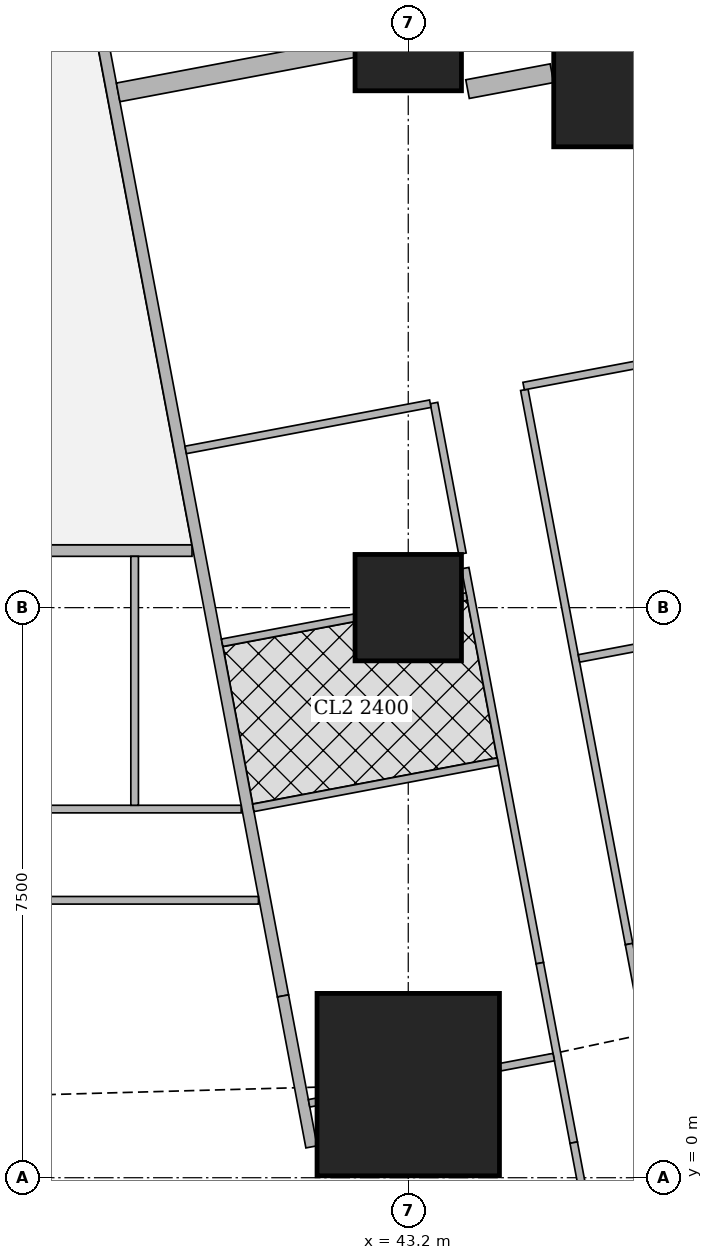
"""IFC4 building model, lengths in metres.
Left out: names, types, materials, properties, quantities, classifications, styles, units other than length and angle.
Written with IfcOpenShell. Run it as: python <this file> out.ifc"""

import sys

from ifc_helpers import new_model, si_unit, direction, frame, frame_2d, origin, origin_2d, place, context, subcontext, project, spatial, rectangle, extrude, element, fill, save


model = new_model("IFC4")
c1 = context("Model", 3, precision=1e-05, world=origin(), true_north=direction((0.0, 1.0)))
c2 = subcontext(c1, "Body", "Model", "MODEL_VIEW")
j1 = project(units=[si_unit("LENGTHUNIT", "METRE"), si_unit("PLANEANGLEUNIT", "RADIAN")], contexts=[c1])
p1 = place(None, origin())
s1 = spatial("IfcSite", under=j1, at=p1, CompositionType="ELEMENT")
p2 = place(p1, origin())
s2 = spatial("IfcBuilding", under=s1, at=p2, CompositionType="ELEMENT")
p3 = place(p2, frame((0.0, 0.0, 216.2)))
s3 = spatial("IfcBuildingStorey", under=s2, at=p3, CompositionType="ELEMENT", Elevation=216.2)
p4 = place(p3, frame((43.2, 1.225, 0.0), z_axis=(0.0, 0.0, 1.0), x_axis=(1.0, 0.0, 0.0)))
e1 = element("IfcColumn", 1, at=p4, inside=s3, PredefinedType="COLUMN", context=c2, shape_type="SweptSolid", body=[
    extrude(rectangle(XDim=2.4, YDim=2.4, at=origin_2d()), origin(), (0.0, 0.0, 1.0), 3.75),
])
for number, where, z_axis, x_axis in (
    (2, (43.2, 7.5, 0.0), (0.0, 0.0, 1.0), (1.0, 0.0, 0.0)),
    (3, (43.2, 15.0, 0.0), (0.0, 0.0, 1.0), (1.0, 0.0, 0.0)),
):
    element("IfcColumn", number, at=place(p3, frame(where, z_axis=z_axis, x_axis=x_axis)), inside=s3, PredefinedType="COLUMN", context=c2, shape_type="SweptSolid", body=[
        extrude(rectangle(XDim=1.4, YDim=1.4, at=origin_2d()), origin(), (0.0, 0.0, 1.0), 3.75),
    ])
p5 = place(p3, frame((46.314, 14.763, 0.0), z_axis=(0.0, 0.0, 1.0), x_axis=(1.0, 0.0, 0.0)))
e4 = element("IfcColumn", 4, at=p5, inside=s3, PredefinedType="COLUMN", context=c2, shape_type="SweptSolid", body=[
    extrude(rectangle(XDim=2.4, YDim=2.4, at=origin_2d()), origin(), (0.0, 0.0, 1.0), 3.75),
])
p6 = place(p3, frame((50.653, 2.703, 0.0), z_axis=(0.0, 0.0, 1.0), x_axis=(-0.185612026696, 0.982623109613, 0.0)))
e5 = element("IfcWall", 5, at=p6, inside=s3, PredefinedType="SOLIDWALL", context=c2, shape_type="SweptSolid", body=[
    extrude(rectangle(XDim=41.393, YDim=0.2, at=frame_2d((20.697, 0.0))), origin(), (0.0, 0.0, 1.0), 3.5),
])
p7 = place(p6, frame((1.633, 0.0, 0.9)))
e6 = element("IfcOpeningElement", 6, at=p7, cuts=e5, PredefinedType="OPENING", context=c2, shape_type="SweptSolid", body=[
    extrude(rectangle(XDim=1.8, YDim=1.5, at=frame_2d((0.9, 0.75))), frame((0.0, 0.11, 0.0), z_axis=(0.0, -1.0, 0.0), x_axis=(1.0, 0.0, 0.0)), (0.0, 0.0, 1.0), 0.22),
])
p8 = place(p6, frame((6.032, 0.0, 0.9)))
e7 = element("IfcOpeningElement", 7, at=p8, cuts=e5, PredefinedType="OPENING", context=c2, shape_type="SweptSolid", body=[
    extrude(rectangle(XDim=1.8, YDim=1.5, at=frame_2d((0.9, 0.75))), frame((0.0, 0.11, 0.0), z_axis=(0.0, -1.0, 0.0), x_axis=(1.0, 0.0, 0.0)), (0.0, 0.0, 1.0), 0.22),
])
p9 = place(p6, frame((9.848, 0.0, 0.9)))
e8 = element("IfcOpeningElement", 8, at=p9, cuts=e5, PredefinedType="OPENING", context=c2, shape_type="SweptSolid", body=[
    extrude(rectangle(XDim=1.8, YDim=1.5, at=frame_2d((0.9, 0.75))), frame((0.0, 0.11, 0.0), z_axis=(0.0, -1.0, 0.0), x_axis=(1.0, 0.0, 0.0)), (0.0, 0.0, 1.0), 0.22),
])
p10 = place(p6, frame((13.664, 0.0, 0.9)))
e9 = element("IfcOpeningElement", 9, at=p10, cuts=e5, PredefinedType="OPENING", context=c2, shape_type="SweptSolid", body=[
    extrude(rectangle(XDim=1.8, YDim=1.5, at=frame_2d((0.9, 0.75))), frame((0.0, 0.11, 0.0), z_axis=(0.0, -1.0, 0.0), x_axis=(1.0, 0.0, 0.0)), (0.0, 0.0, 1.0), 0.22),
])
p11 = place(p6, frame((17.481, 0.0, 0.9)))
e10 = element("IfcOpeningElement", 10, at=p11, cuts=e5, PredefinedType="OPENING", context=c2, shape_type="SweptSolid", body=[
    extrude(rectangle(XDim=1.8, YDim=1.5, at=frame_2d((0.9, 0.75))), frame((0.0, 0.11, 0.0), z_axis=(0.0, -1.0, 0.0), x_axis=(1.0, 0.0, 0.0)), (0.0, 0.0, 1.0), 0.22),
])
p12 = place(p6, frame((21.297, 0.0, 0.9)))
e11 = element("IfcOpeningElement", 11, at=p12, cuts=e5, PredefinedType="OPENING", context=c2, shape_type="SweptSolid", body=[
    extrude(rectangle(XDim=1.8, YDim=1.5, at=frame_2d((0.9, 0.75))), frame((0.0, 0.11, 0.0), z_axis=(0.0, -1.0, 0.0), x_axis=(1.0, 0.0, 0.0)), (0.0, 0.0, 1.0), 0.22),
])
p13 = place(p6, frame((25.113, 0.0, 0.9)))
e12 = element("IfcOpeningElement", 12, at=p13, cuts=e5, PredefinedType="OPENING", context=c2, shape_type="SweptSolid", body=[
    extrude(rectangle(XDim=1.8, YDim=1.5, at=frame_2d((0.9, 0.75))), frame((0.0, 0.11, 0.0), z_axis=(0.0, -1.0, 0.0), x_axis=(1.0, 0.0, 0.0)), (0.0, 0.0, 1.0), 0.22),
])
p14 = place(p6, frame((28.93, 0.0, 0.9)))
e13 = element("IfcOpeningElement", 13, at=p14, cuts=e5, PredefinedType="OPENING", context=c2, shape_type="SweptSolid", body=[
    extrude(rectangle(XDim=1.8, YDim=1.5, at=frame_2d((0.9, 0.75))), frame((0.0, 0.11, 0.0), z_axis=(0.0, -1.0, 0.0), x_axis=(1.0, 0.0, 0.0)), (0.0, 0.0, 1.0), 0.22),
])
p15 = place(p6, frame((32.746, 0.0, 0.9)))
e14 = element("IfcOpeningElement", 14, at=p15, cuts=e5, PredefinedType="OPENING", context=c2, shape_type="SweptSolid", body=[
    extrude(rectangle(XDim=1.8, YDim=1.5, at=frame_2d((0.9, 0.75))), frame((0.0, 0.11, 0.0), z_axis=(0.0, -1.0, 0.0), x_axis=(1.0, 0.0, 0.0)), (0.0, 0.0, 1.0), 0.22),
])
p16 = place(p6, frame((36.481, 0.0, 0.9)))
e15 = element("IfcOpeningElement", 15, at=p16, cuts=e5, PredefinedType="OPENING", context=c2, shape_type="SweptSolid", body=[
    extrude(rectangle(XDim=1.8, YDim=1.5, at=frame_2d((0.9, 0.75))), frame((0.0, 0.11, 0.0), z_axis=(0.0, -1.0, 0.0), x_axis=(1.0, 0.0, 0.0)), (0.0, 0.0, 1.0), 0.22),
])
p17 = place(p3, frame((40.355, 8.25, 0.0), z_axis=(0.0, 0.0, 1.0), x_axis=(-1.0, 0.0, 0.0)))
e16 = element("IfcWall", 16, at=p17, inside=s3, PredefinedType="SOLIDWALL", context=c2, shape_type="SweptSolid", body=[
    extrude(rectangle(XDim=3.654, YDim=0.15, at=frame_2d((1.827, 0.0))), origin(), (0.0, 0.0, 1.0), 3.5),
])
p18 = place(p3, frame((33.933, 42.73, 0.0), z_axis=(0.0, 0.0, 1.0), x_axis=(0.185595417643, -0.982626246825, 0.0)))
e17 = element("IfcWall", 17, at=p18, inside=s3, PredefinedType="SOLIDWALL", context=c2, shape_type="SweptSolid", body=[
    extrude(rectangle(XDim=41.051, YDim=0.15, at=frame_2d((20.525, 0.0))), origin(), (0.0, 0.0, 1.0), 2.5),
])
p19 = place(p18, frame((12.266, 0.0, 0.0)))
e18 = element("IfcOpeningElement", 18, at=p19, cuts=e17, PredefinedType="OPENING", context=c2, shape_type="SweptSolid", body=[
    extrude(rectangle(XDim=1.0, YDim=2.1, at=frame_2d((0.5, 1.05))), frame((0.0, 0.085, 0.0), z_axis=(0.0, -1.0, 0.0), x_axis=(1.0, 0.0, 0.0)), (0.0, 0.0, 1.0), 0.17),
])
p20 = place(p18, frame((16.082, 0.0, 0.0)))
e19 = element("IfcOpeningElement", 19, at=p20, cuts=e17, PredefinedType="OPENING", context=c2, shape_type="SweptSolid", body=[
    extrude(rectangle(XDim=1.0, YDim=2.1, at=frame_2d((0.5, 1.05))), frame((0.0, 0.085, 0.0), z_axis=(0.0, -1.0, 0.0), x_axis=(1.0, 0.0, 0.0)), (0.0, 0.0, 1.0), 0.17),
])
p21 = place(p18, frame((24.369, 0.0, 0.0)))
e20 = element("IfcOpeningElement", 20, at=p21, cuts=e17, PredefinedType="OPENING", context=c2, shape_type="SweptSolid", body=[
    extrude(rectangle(XDim=1.0, YDim=2.1, at=frame_2d((0.5, 1.05))), frame((0.0, 0.085, 0.0), z_axis=(0.0, -1.0, 0.0), x_axis=(1.0, 0.0, 0.0)), (0.0, 0.0, 1.0), 0.17),
])
p22 = place(p18, frame((30.862, 0.0, 0.0)))
e21 = element("IfcOpeningElement", 21, at=p22, cuts=e17, PredefinedType="OPENING", context=c2, shape_type="SweptSolid", body=[
    extrude(rectangle(XDim=1.0, YDim=2.1, at=frame_2d((0.5, 1.05))), frame((0.0, 0.085, 0.0), z_axis=(0.0, -1.0, 0.0), x_axis=(1.0, 0.0, 0.0)), (0.0, 0.0, 1.0), 0.17),
])
p23 = place(p3, frame((41.552, 2.392, 0.0), z_axis=(0.0, 0.0, 1.0), x_axis=(0.185535500323, -0.982637561932, 0.0)))
e22 = element("IfcWall", 22, at=p23, inside=s3, PredefinedType="SOLIDWALL", context=c2, shape_type="SweptSolid", body=[
    extrude(rectangle(XDim=2.021, YDim=0.15, at=frame_2d((1.011, 0.0))), origin(), (0.0, 0.0, 1.0), 2.05),
])
p24 = place(p3, frame((41.229, 3.65, 0.0), z_axis=(0.0, 0.0, 1.0), x_axis=(-1.0, 0.0, 0.0)))
e23 = element("IfcWall", 23, at=p24, inside=s3, PredefinedType="PARTITIONING", context=c2, shape_type="SweptSolid", body=[
    extrude(rectangle(XDim=5.229, YDim=0.1, at=frame_2d((2.615, 0.0))), origin(), (0.0, 0.0, 1.0), 3.5),
])
p25 = place(p24, frame((4.129, 0.0, 0.0)))
e24 = element("IfcOpeningElement", 24, at=p25, cuts=e23, PredefinedType="OPENING", context=c2, shape_type="SweptSolid", body=[
    extrude(rectangle(XDim=0.9, YDim=2.1, at=frame_2d((0.45, 1.05))), frame((0.0, 0.06, 0.0), z_axis=(0.0, -1.0, 0.0), x_axis=(1.0, 0.0, 0.0)), (0.0, 0.0, 1.0), 0.12),
])
p26 = place(p3, frame((41.002, 4.85, 0.0), z_axis=(0.0, 0.0, 1.0), x_axis=(-1.0, 0.0, 0.0)))
e25 = element("IfcWall", 25, at=p26, inside=s3, PredefinedType="PARTITIONING", context=c2, shape_type="SweptSolid", body=[
    extrude(rectangle(XDim=5.002, YDim=0.1, at=frame_2d((2.501, 0.0))), origin(), (0.0, 0.0, 1.0), 3.5),
])
p27 = place(p26, frame((3.447, 0.0, 0.0)))
e26 = element("IfcOpeningElement", 26, at=p27, cuts=e25, PredefinedType="OPENING", context=c2, shape_type="SweptSolid", body=[
    extrude(rectangle(XDim=0.9, YDim=2.1, at=frame_2d((0.45, 1.05))), frame((0.0, 0.06, 0.0), z_axis=(0.0, -1.0, 0.0), x_axis=(1.0, 0.0, 0.0)), (0.0, 0.0, 1.0), 0.12),
])
p28 = place(p26, frame((0.15, 0.0, 0.0)))
e27 = element("IfcOpeningElement", 27, at=p28, cuts=e25, PredefinedType="OPENING", context=c2, shape_type="SweptSolid", body=[
    extrude(rectangle(XDim=0.9, YDim=2.1, at=frame_2d((0.45, 1.05))), frame((0.0, 0.06, 0.0), z_axis=(0.0, -1.0, 0.0), x_axis=(1.0, 0.0, 0.0)), (0.0, 0.0, 1.0), 0.12),
])
p29 = place(p26, frame((1.647, 0.0, 0.0)))
e28 = element("IfcOpeningElement", 28, at=p29, cuts=e25, PredefinedType="OPENING", context=c2, shape_type="SweptSolid", body=[
    extrude(rectangle(XDim=0.9, YDim=2.1, at=frame_2d((0.45, 1.05))), frame((0.0, 0.06, 0.0), z_axis=(0.0, -1.0, 0.0), x_axis=(1.0, 0.0, 0.0)), (0.0, 0.0, 1.0), 0.12),
])
p30 = place(p3, frame((39.6, 4.9, 0.0), z_axis=(0.0, 0.0, 1.0), x_axis=(0.0, 1.0, 0.0)))
e29 = element("IfcWall", 29, at=p30, inside=s3, PredefinedType="PARTITIONING", context=c2, shape_type="SweptSolid", body=[
    extrude(rectangle(XDim=3.275, YDim=0.1, at=frame_2d((1.638, 0.0))), origin(), (0.0, 0.0, 1.0), 3.5),
])
p31 = place(p3, frame((44.727, 10.366, 0.0), z_axis=(0.0, 0.0, 1.0), x_axis=(0.185678775129, -0.982610498858, 0.0)))
e30 = element("IfcWall", 30, at=p31, inside=s3, PredefinedType="PARTITIONING", context=c2, shape_type="SweptSolid", body=[
    extrude(rectangle(XDim=7.421, YDim=0.1, at=frame_2d((3.71, 0.0))), origin(), (0.0, 0.0, 1.0), 3.5),
])
p32 = place(p31, frame((0.151, 0.0, 0.0)))
e31 = element("IfcOpeningElement", 31, at=p32, cuts=e30, PredefinedType="OPENING", context=c2, shape_type="SweptSolid", body=[
    extrude(rectangle(XDim=0.9, YDim=2.1, at=frame_2d((0.45, 1.05))), frame((0.0, 0.06, 0.0), z_axis=(0.0, -1.0, 0.0), x_axis=(1.0, 0.0, 0.0)), (0.0, 0.0, 1.0), 0.12),
])
p33 = place(p31, frame((4.65, 0.0, 0.0)))
e32 = element("IfcOpeningElement", 32, at=p33, cuts=e30, PredefinedType="OPENING", context=c2, shape_type="SweptSolid", body=[
    extrude(rectangle(XDim=0.9, YDim=2.1, at=frame_2d((0.45, 1.05))), frame((0.0, 0.06, 0.0), z_axis=(0.0, -1.0, 0.0), x_axis=(1.0, 0.0, 0.0)), (0.0, 0.0, 1.0), 0.12),
])
p34 = place(p3, frame((46.105, 3.074, 0.0), z_axis=(0.0, 0.0, 1.0), x_axis=(0.185631845838, -0.982619365681, 0.0)))
e33 = element("IfcWall", 33, at=p34, inside=s3, PredefinedType="PARTITIONING", context=c2, shape_type="SweptSolid", body=[
    extrude(rectangle(XDim=2.403, YDim=0.1, at=frame_2d((1.201, 0.0))), origin(), (0.0, 0.0, 1.0), 2.05),
])
p35 = place(p3, frame((43.539, 10.192, 0.0), z_axis=(0.0, 0.0, 1.0), x_axis=(0.185443145218, -0.982654995353, 0.0)))
e34 = element("IfcWall", 34, at=p35, inside=s3, PredefinedType="PARTITIONING", context=c2, shape_type="SweptSolid", body=[
    extrude(rectangle(XDim=2.017, YDim=0.1, at=frame_2d((1.008, 0.0))), origin(), (0.0, 0.0, 1.0), 3.5),
])
p36 = place(p3, frame((43.949, 8.02, 0.0), z_axis=(0.0, 0.0, 1.0), x_axis=(0.185656792073, -0.982614652627, 0.0)))
e35 = element("IfcWall", 35, at=p36, inside=s3, PredefinedType="PARTITIONING", context=c2, shape_type="SweptSolid", body=[
    extrude(rectangle(XDim=5.289, YDim=0.1, at=frame_2d((2.645, 0.0))), origin(), (0.0, 0.0, 1.0), 3.5),
])
p37 = place(p36, frame((1.2, 0.0, 0.0)))
e36 = element("IfcOpeningElement", 36, at=p37, cuts=e35, PredefinedType="OPENING", context=c2, shape_type="SweptSolid", body=[
    extrude(rectangle(XDim=0.9, YDim=2.1, at=frame_2d((0.45, 1.05))), frame((0.0, 0.06, 0.0), z_axis=(0.0, -1.0, 0.0), x_axis=(1.0, 0.0, 0.0)), (0.0, 0.0, 1.0), 0.12),
])
p38 = place(p36, frame((2.935, 0.0, 0.0)))
e37 = element("IfcOpeningElement", 37, at=p38, cuts=e35, PredefinedType="OPENING", context=c2, shape_type="SweptSolid", body=[
    extrude(rectangle(XDim=0.9, YDim=2.1, at=frame_2d((0.45, 1.05))), frame((0.0, 0.06, 0.0), z_axis=(0.0, -1.0, 0.0), x_axis=(1.0, 0.0, 0.0)), (0.0, 0.0, 1.0), 0.12),
])
p39 = place(p3, frame((44.931, 2.823, 0.0), z_axis=(0.0, 0.0, 1.0), x_axis=(0.185631845838, -0.982619365681, 0.0)))
e38 = element("IfcWall", 38, at=p39, inside=s3, PredefinedType="PARTITIONING", context=c2, shape_type="SweptSolid", body=[
    extrude(rectangle(XDim=2.403, YDim=0.1, at=frame_2d((1.201, 0.0))), origin(), (0.0, 0.0, 1.0), 2.05),
])
p40 = place(p3, frame((45.377, 0.462, 0.0), z_axis=(0.0, 0.0, 1.0), x_axis=(0.185513480919, -0.982641719243, 0.0)))
e39 = element("IfcWall", 39, at=p40, inside=s3, PredefinedType="PARTITIONING", context=c2, shape_type="SweptSolid", body=[
    extrude(rectangle(XDim=1.095, YDim=0.1, at=frame_2d((0.547, 0.0))), origin(), (0.0, 0.0, 1.0), 3.5),
])
p41 = place(p3, frame((48.943, 11.213, 0.0), z_axis=(0.0, 0.0, 1.0), x_axis=(-0.982633535512, -0.185556823879, 0.0)))
e40 = element("IfcWall", 40, at=p41, inside=s3, PredefinedType="PARTITIONING", context=c2, shape_type="SweptSolid", body=[
    extrude(rectangle(XDim=4.3, YDim=0.1, at=frame_2d((2.15, 0.0))), origin(), (0.0, 0.0, 1.0), 2.05),
])
p42 = place(p3, frame((46.52, 7.035, 0.0), z_axis=(0.0, 0.0, 1.0), x_axis=(-0.982620932907, -0.185623549726, 0.0)))
e41 = element("IfcWall", 41, at=p42, inside=s3, PredefinedType="PARTITIONING", context=c2, shape_type="SweptSolid", body=[
    extrude(rectangle(XDim=1.093, YDim=0.1, at=frame_2d((0.546, 0.0))), origin(), (0.0, 0.0, 1.0), 3.5),
])
p43 = place(p3, frame((43.49, 10.183, 0.0), z_axis=(0.0, 0.0, 1.0), x_axis=(-0.982607026909, -0.185697147715, 0.0)))
e42 = element("IfcWall", 42, at=p43, inside=s3, PredefinedType="PARTITIONING", context=c2, shape_type="SweptSolid", body=[
    extrude(rectangle(XDim=3.275, YDim=0.1, at=frame_2d((1.637, 0.0))), origin(), (0.0, 0.0, 1.0), 3.5),
])
p44 = place(p43, frame((1.2, 0.0, 0.0)))
e43 = element("IfcOpeningElement", 43, at=p44, cuts=e42, PredefinedType="OPENING", context=c2, shape_type="SweptSolid", body=[
    extrude(rectangle(XDim=0.9, YDim=2.1, at=frame_2d((0.45, 1.05))), frame((0.0, 0.06, 0.0), z_axis=(0.0, -1.0, 0.0), x_axis=(1.0, 0.0, 0.0)), (0.0, 0.0, 1.0), 0.12),
])
p45 = place(p3, frame((43.969, 7.646, 0.0), z_axis=(0.0, 0.0, 1.0), x_axis=(-0.983147034646, -0.182816597351, 0.0)))
e44 = element("IfcWall", 44, at=p45, inside=s3, PredefinedType="PARTITIONING", context=c2, shape_type="SweptSolid", body=[
    extrude(rectangle(XDim=0.06, YDim=0.1, at=frame_2d((0.03, 0.0))), origin(), (0.0, 0.0, 1.0), 3.5),
])
p46 = place(p3, frame((42.49, 7.367, 0.0), z_axis=(0.0, 0.0, 1.0), x_axis=(-0.982585223885, -0.185812480215, 0.0)))
e45 = element("IfcWall", 45, at=p46, inside=s3, PredefinedType="PARTITIONING", context=c2, shape_type="SweptSolid", body=[
    extrude(rectangle(XDim=1.77, YDim=0.1, at=frame_2d((0.885, 0.0))), origin(), (0.0, 0.0, 1.0), 3.5),
])
p47 = place(p3, frame((45.114, 1.587, 0.0), z_axis=(0.0, 0.0, 1.0), x_axis=(-0.982671022916, -0.185358195723, 0.0)))
e46 = element("IfcWall", 46, at=p47, inside=s3, PredefinedType="PARTITIONING", context=c2, shape_type="SweptSolid", body=[
    extrude(rectangle(XDim=0.717, YDim=0.1, at=frame_2d((0.358, 0.0))), origin(), (0.0, 0.0, 1.0), 2.05),
])
p48 = place(p3, frame((41.99, 0.997, 0.0), z_axis=(0.0, 0.0, 1.0), x_axis=(-0.982382747416, -0.186880008506, 0.0)))
e47 = element("IfcWall", 47, at=p48, inside=s3, PredefinedType="PARTITIONING", context=c2, shape_type="SweptSolid", body=[
    extrude(rectangle(XDim=0.097, YDim=0.1, at=frame_2d((0.048, 0.0))), origin(), (0.0, 0.0, 1.0), 2.05),
])
p49 = place(p3, frame((44.379, 5.474, 0.0), z_axis=(0.0, 0.0, 1.0), x_axis=(-0.982607026909, -0.185697147715, 0.0)))
e48 = element("IfcWall", 48, at=p49, inside=s3, PredefinedType="PARTITIONING", context=c2, shape_type="SweptSolid", body=[
    extrude(rectangle(XDim=3.275, YDim=0.1, at=frame_2d((1.637, 0.0))), origin(), (0.0, 0.0, 1.0), 3.5),
])
p50 = place(p3, frame((45.09, 14.531, 0.0), z_axis=(0.0, 0.0, 1.0), x_axis=(-0.982737354171, -0.185006196431, 0.0)))
e49 = element("IfcWall", 49, at=p50, inside=s3, PredefinedType="SOLIDWALL", context=c2, shape_type="SweptSolid", body=[
    extrude(rectangle(XDim=1.13, YDim=0.25, at=frame_2d((0.565, 0.0))), origin(), (0.0, 0.0, 1.0), 2.05),
])
p51 = place(p3, frame((42.476, 14.863, 0.0), z_axis=(0.0, 0.0, 1.0), x_axis=(-0.982638716117, -0.185529387398, 0.0)))
e50 = element("IfcWall", 50, at=p51, inside=s3, PredefinedType="SOLIDWALL", context=c2, shape_type="SweptSolid", body=[
    extrude(rectangle(XDim=3.148, YDim=0.25, at=frame_2d((1.574, 0.0))), origin(), (0.0, 0.0, 1.0), 3.5),
])
p52 = place(p28, origin())
e51 = element("IfcDoor", 51, at=p52, inside=s3, OperationType="SINGLE_SWING_RIGHT", PredefinedType="DOOR", context=c2, shape_type="SweptSolid", body=[
    extrude(rectangle(XDim=0.9, YDim=2.1, at=frame_2d((0.45, 1.05))), frame((0.0, 0.025, 0.0), z_axis=(0.0, -1.0, 0.0), x_axis=(1.0, 0.0, 0.0)), (0.0, 0.0, 1.0), 0.05),
])
fill(e27, e51)
p53 = place(p29, origin())
e52 = element("IfcDoor", 52, at=p53, inside=s3, OperationType="SINGLE_SWING_RIGHT", PredefinedType="DOOR", context=c2, shape_type="SweptSolid", body=[
    extrude(rectangle(XDim=0.9, YDim=2.1, at=frame_2d((0.45, 1.05))), frame((0.0, 0.025, 0.0), z_axis=(0.0, -1.0, 0.0), x_axis=(1.0, 0.0, 0.0)), (0.0, 0.0, 1.0), 0.05),
])
fill(e28, e52)
p54 = place(p32, origin())
e53 = element("IfcDoor", 53, at=p54, inside=s3, OperationType="SINGLE_SWING_LEFT", PredefinedType="DOOR", context=c2, shape_type="SweptSolid", body=[
    extrude(rectangle(XDim=0.9, YDim=2.1, at=frame_2d((0.45, 1.05))), frame((0.0, 0.025, 0.0), z_axis=(0.0, -1.0, 0.0), x_axis=(1.0, 0.0, 0.0)), (0.0, 0.0, 1.0), 0.05),
])
fill(e31, e53)
p55 = place(p33, origin())
e54 = element("IfcDoor", 54, at=p55, inside=s3, OperationType="SINGLE_SWING_LEFT", PredefinedType="DOOR", context=c2, shape_type="SweptSolid", body=[
    extrude(rectangle(XDim=0.9, YDim=2.1, at=frame_2d((0.45, 1.05))), frame((0.0, 0.025, 0.0), z_axis=(0.0, -1.0, 0.0), x_axis=(1.0, 0.0, 0.0)), (0.0, 0.0, 1.0), 0.05),
])
fill(e32, e54)
p56 = place(p37, origin())
e55 = element("IfcDoor", 55, at=p56, inside=s3, OperationType="SINGLE_SWING_LEFT", PredefinedType="DOOR", context=c2, shape_type="SweptSolid", body=[
    extrude(rectangle(XDim=0.9, YDim=2.1, at=frame_2d((0.45, 1.05))), frame((0.0, 0.025, 0.0), z_axis=(0.0, -1.0, 0.0), x_axis=(1.0, 0.0, 0.0)), (0.0, 0.0, 1.0), 0.05),
])
fill(e36, e55)
p57 = place(p38, origin())
e56 = element("IfcDoor", 56, at=p57, inside=s3, OperationType="SINGLE_SWING_RIGHT", PredefinedType="DOOR", context=c2, shape_type="SweptSolid", body=[
    extrude(rectangle(XDim=0.9, YDim=2.1, at=frame_2d((0.45, 1.05))), frame((0.0, 0.025, 0.0), z_axis=(0.0, -1.0, 0.0), x_axis=(1.0, 0.0, 0.0)), (0.0, 0.0, 1.0), 0.05),
])
fill(e37, e56)
p58 = place(p22, origin())
e57 = element("IfcDoor", 57, at=p58, inside=s3, OperationType="SINGLE_SWING_LEFT", PredefinedType="DOOR", context=c2, shape_type="SweptSolid", body=[
    extrude(rectangle(XDim=1.0, YDim=2.1, at=frame_2d((0.5, 1.05))), frame((0.0, 0.025, 0.0), z_axis=(0.0, -1.0, 0.0), x_axis=(1.0, 0.0, 0.0)), (0.0, 0.0, 1.0), 0.05),
])
fill(e21, e57)
p59 = place(p44, origin())
e58 = element("IfcDoor", 58, at=p59, inside=s3, OperationType="SINGLE_SWING_LEFT", PredefinedType="DOOR", context=c2, shape_type="SweptSolid", body=[
    extrude(rectangle(XDim=0.9, YDim=2.1, at=frame_2d((0.45, 1.05))), frame((0.0, 0.025, 0.0), z_axis=(0.0, -1.0, 0.0), x_axis=(1.0, 0.0, 0.0)), (0.0, 0.0, 1.0), 0.05),
])
fill(e43, e58)
save(model, sys.argv[1])
